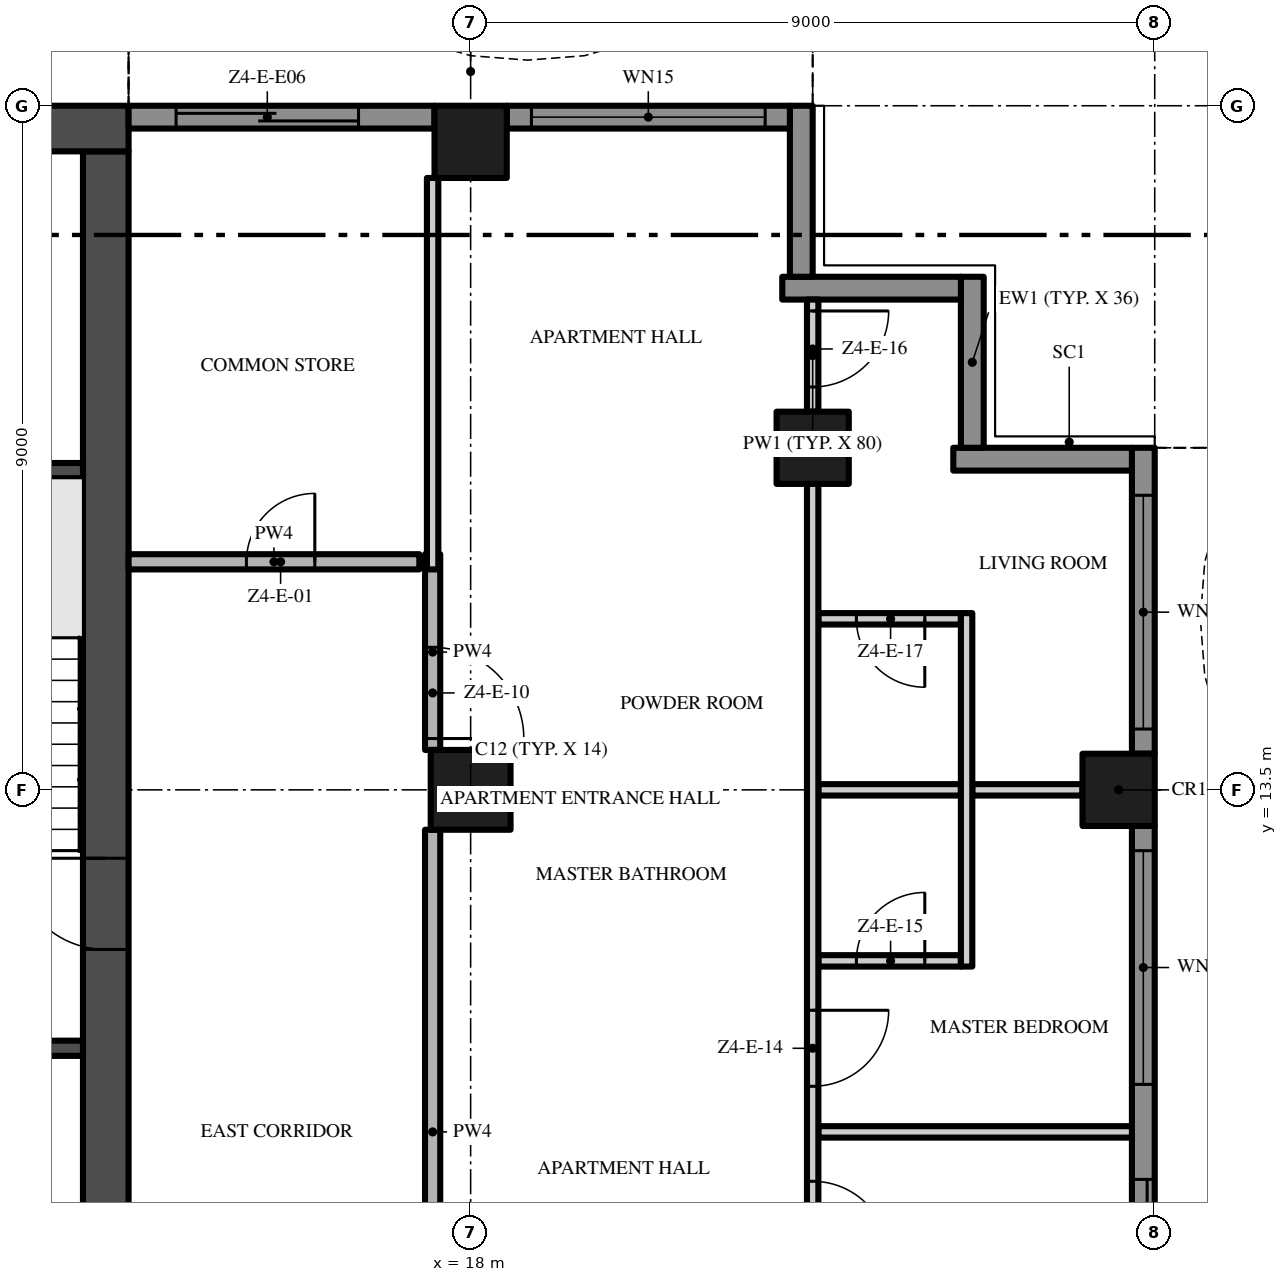
"""IFC4 building model, lengths in metres.
Left out: names, types, materials, properties, quantities, classifications, styles, units other than length and angle.
Written with IfcOpenShell. Run it as: python <this file> out.ifc"""

import sys

from ifc_helpers import new_model, si_unit, direction, frame, frame_2d, origin, origin_2d, place, context, subcontext, project, spatial, polyline, rectangle, outline, extrude, element, fill, save


model = new_model("IFC4")
c1 = context("Model", 3, precision=1e-05, world=origin(), true_north=direction((0.0, 1.0)))
c2 = subcontext(c1, "Body", "Model", "MODEL_VIEW")
j1 = project(units=[si_unit("LENGTHUNIT", "METRE"), si_unit("PLANEANGLEUNIT", "RADIAN")], contexts=[c1])
p1 = place(None, origin())
s1 = spatial("IfcSite", under=j1, at=p1, CompositionType="ELEMENT")
p2 = place(p1, origin())
s2 = spatial("IfcBuilding", under=s1, at=p2, CompositionType="ELEMENT")
p3 = place(p2, frame((0.0, 0.0, 226.2)))
s3 = spatial("IfcBuildingStorey", under=s2, at=p3, CompositionType="ELEMENT", Elevation=226.2)
p4 = place(p3, frame((13.2, 5.1, -0.3), z_axis=(0.0, 0.0, 1.0), x_axis=(0.0, 1.0, 0.0)))
e1 = element("IfcWall", 1, at=p4, inside=s3, PredefinedType="SHEAR", context=c2, shape_type="SweptSolid", body=[
    extrude(rectangle(XDim=16.8, YDim=0.6, at=frame_2d((8.4, 0.0))), origin(), (0.0, 0.0, 1.0), 3.8),
])
p5 = place(p4, frame((6.3, 0.0, 0.3)))
e2 = element("IfcOpeningElement", 2, at=p5, cuts=e1, PredefinedType="OPENING", context=c2, shape_type="SweptSolid", body=[
    extrude(rectangle(XDim=1.2, YDim=2.2, at=frame_2d((0.6, 1.1))), frame((0.0, 0.31, 0.0), z_axis=(0.0, -1.0, 0.0), x_axis=(1.0, 0.0, 0.0)), (0.0, 0.0, 1.0), 0.62),
])
p6 = place(p3, frame((13.5, 22.2, -0.3), z_axis=(0.0, 0.0, 1.0), x_axis=(-1.0, 0.0, 0.0)))
e3 = element("IfcWall", 3, at=p6, inside=s3, PredefinedType="SHEAR", context=c2, shape_type="SweptSolid", body=[
    extrude(rectangle(XDim=27.0, YDim=0.6, at=frame_2d((13.5, 0.0))), origin(), (0.0, 0.0, 1.0), 3.8),
])
p7 = place(p3, frame((18.0, 13.5, 0.0), z_axis=(0.0, 0.0, 1.0), x_axis=(1.0, 0.0, 0.0)))
e4 = element("IfcColumn", 4, at=p7, inside=s3, PredefinedType="COLUMN", context=c2, shape_type="SweptSolid", body=[
    extrude(rectangle(XDim=1.05, YDim=1.05, at=origin_2d()), origin(), (0.0, 0.0, 1.0), 3.5),
])
for number, where, z_axis, x_axis in (
    (5, (18.0, 22.025, 0.0), (0.0, 0.0, 1.0), (1.0, 0.0, 0.0)),
    (6, (26.525, 13.5, 0.0), (0.0, 0.0, 1.0), (1.0, 0.0, 0.0)),
    (7, (22.5, 18.0, 0.0), (0.0, 0.0, 1.0), (1.0, 0.0, 0.0)),
):
    element("IfcColumn", number, at=place(p3, frame(where, z_axis=z_axis, x_axis=x_axis)), inside=s3, PredefinedType="COLUMN", context=c2, shape_type="SweptSolid", body=[
        extrude(rectangle(XDim=0.95, YDim=0.95, at=origin_2d()), origin(), (0.0, 0.0, 1.0), 3.5),
    ])
p8 = place(p3, frame((26.85, 13.025, 0.0), z_axis=(0.0, 0.0, 1.0), x_axis=(0.0, -1.0, 0.0)))
e8 = element("IfcWall", 8, at=p8, inside=s3, PredefinedType="SOLIDWALL", context=c2, shape_type="SweptSolid", body=[
    extrude(rectangle(XDim=8.05, YDim=0.3, at=frame_2d((4.025, 0.0))), origin(), (0.0, 0.0, 1.0), 3.5),
])
p9 = place(p8, frame((4.65, 0.0, 0.0)))
e9 = element("IfcOpeningElement", 9, at=p9, cuts=e8, PredefinedType="OPENING", context=c2, shape_type="SweptSolid", body=[
    extrude(rectangle(XDim=3.075, YDim=2.4, at=frame_2d((1.538, 1.2))), frame((0.0, 0.16, 0.0), z_axis=(0.0, -1.0, 0.0), x_axis=(1.0, 0.0, 0.0)), (0.0, 0.0, 1.0), 0.32),
])
p10 = place(p8, frame((0.325, 0.0, 0.45)))
e10 = element("IfcOpeningElement", 10, at=p10, cuts=e8, PredefinedType="OPENING", context=c2, shape_type="SweptSolid", body=[
    extrude(rectangle(XDim=3.075, YDim=2.65, at=frame_2d((1.538, 1.325))), frame((0.0, 0.16, 0.0), z_axis=(0.0, -1.0, 0.0), x_axis=(1.0, 0.0, 0.0)), (0.0, 0.0, 1.0), 0.32),
])
p11 = place(p3, frame((26.85, 18.0, 0.0), z_axis=(0.0, 0.0, 1.0), x_axis=(0.0, -1.0, 0.0)))
e11 = element("IfcWall", 11, at=p11, inside=s3, PredefinedType="SOLIDWALL", context=c2, shape_type="SweptSolid", body=[
    extrude(rectangle(XDim=4.025, YDim=0.3, at=frame_2d((2.013, 0.0))), origin(), (0.0, 0.0, 1.0), 3.5),
])
p12 = place(p11, frame((0.625, 0.0, 0.45)))
e12 = element("IfcOpeningElement", 12, at=p12, cuts=e11, PredefinedType="OPENING", context=c2, shape_type="SweptSolid", body=[
    extrude(rectangle(XDim=3.075, YDim=2.65, at=frame_2d((1.538, 1.325))), frame((0.0, 0.16, 0.0), z_axis=(0.0, -1.0, 0.0), x_axis=(1.0, 0.0, 0.0)), (0.0, 0.0, 1.0), 0.32),
])
p13 = place(p3, frame((24.35, 17.85, 0.0), z_axis=(0.0, 0.0, 1.0), x_axis=(1.0, 0.0, 0.0)))
e13 = element("IfcWall", 13, at=p13, inside=s3, PredefinedType="SOLIDWALL", context=c2, shape_type="SweptSolid", body=[
    extrude(rectangle(XDim=2.35, YDim=0.3, at=frame_2d((1.175, 0.0))), origin(), (0.0, 0.0, 1.0), 3.5),
])
p14 = place(p3, frame((24.6, 20.25, 0.0), z_axis=(0.0, 0.0, 1.0), x_axis=(0.0, -1.0, 0.0)))
e14 = element("IfcWall", 14, at=p14, inside=s3, PredefinedType="SOLIDWALL", context=c2, shape_type="SweptSolid", body=[
    extrude(rectangle(XDim=2.25, YDim=0.3, at=frame_2d((1.125, 0.0))), origin(), (0.0, 0.0, 1.0), 3.5),
])
p15 = place(p3, frame((22.1, 20.1, 0.0), z_axis=(0.0, 0.0, 1.0), x_axis=(1.0, 0.0, 0.0)))
e15 = element("IfcWall", 15, at=p15, inside=s3, PredefinedType="SOLIDWALL", context=c2, shape_type="SweptSolid", body=[
    extrude(rectangle(XDim=2.35, YDim=0.3, at=frame_2d((1.175, 0.0))), origin(), (0.0, 0.0, 1.0), 3.5),
])
p16 = place(p3, frame((22.35, 22.5, 0.0), z_axis=(0.0, 0.0, 1.0), x_axis=(0.0, -1.0, 0.0)))
e16 = element("IfcWall", 16, at=p16, inside=s3, PredefinedType="SOLIDWALL", context=c2, shape_type="SweptSolid", body=[
    extrude(rectangle(XDim=2.25, YDim=0.3, at=frame_2d((1.125, 0.0))), origin(), (0.0, 0.0, 1.0), 3.5),
])
p17 = place(p3, frame((18.475, 22.35, 0.0), z_axis=(0.0, 0.0, 1.0), x_axis=(1.0, 0.0, 0.0)))
e17 = element("IfcWall", 17, at=p17, inside=s3, PredefinedType="SOLIDWALL", context=c2, shape_type="SweptSolid", body=[
    extrude(rectangle(XDim=3.725, YDim=0.3, at=frame_2d((1.863, 0.0))), origin(), (0.0, 0.0, 1.0), 3.5),
])
p18 = place(p17, frame((0.325, 0.0, 0.45)))
e18 = element("IfcOpeningElement", 18, at=p18, cuts=e17, PredefinedType="OPENING", context=c2, shape_type="SweptSolid", body=[
    extrude(rectangle(XDim=3.075, YDim=2.65, at=frame_2d((1.538, 1.325))), frame((0.0, 0.16, 0.0), z_axis=(0.0, -1.0, 0.0), x_axis=(1.0, 0.0, 0.0)), (0.0, 0.0, 1.0), 0.32),
])
p19 = place(p3, frame((13.5, 22.35, 0.0), z_axis=(0.0, 0.0, 1.0), x_axis=(1.0, 0.0, 0.0)))
e19 = element("IfcWall", 19, at=p19, inside=s3, PredefinedType="SOLIDWALL", context=c2, shape_type="SweptSolid", body=[
    extrude(rectangle(XDim=4.025, YDim=0.3, at=frame_2d((2.013, 0.0))), origin(), (0.0, 0.0, 1.0), 3.5),
])
p20 = place(p19, frame((0.625, 0.0, 0.0)))
e20 = element("IfcOpeningElement", 20, at=p20, cuts=e19, PredefinedType="OPENING", context=c2, shape_type="SweptSolid", body=[
    extrude(rectangle(XDim=2.4, YDim=2.4, at=frame_2d((1.2, 1.2))), frame((0.0, 0.16, 0.0), z_axis=(0.0, -1.0, 0.0), x_axis=(1.0, 0.0, 0.0)), (0.0, 0.0, 1.0), 0.32),
])
p21 = place(p3, origin())
e21 = element("IfcWall", 21, at=p21, inside=s3, PredefinedType="USERDEFINED", context=c2, shape_type="SweptSolid", body=[
    extrude(outline(polyline([(28.8, -18.0), (28.095, -16.5), (27.659, -15.0), (27.6, -14.25), (27.659, -13.5), (28.095, -12.0), (28.8, -10.5), (29.505, -9.0), (29.941, -7.5), (30.0, -6.75), (29.941, -6.0), (29.505, -4.5), (28.8, -3.0), (28.095, -1.5), (27.659, 0.0), (27.6, 0.75), (27.659, 1.5), (28.095, 3.0), (28.8, 4.5), (29.505, 6.0), (29.941, 7.5), (30.0, 8.25), (29.941, 9.0), (29.505, 10.5), (28.8, 12.0), (28.095, 13.5), (27.659, 15.0), (27.6, 15.75), (27.659, 16.5), (28.095, 18.0), (27.855, 18.07), (27.411, 16.545), (27.349, 15.75), (27.411, 14.955), (27.86, 13.411), (28.574, 11.894), (29.271, 10.411), (29.694, 8.955), (29.749, 8.25), (29.694, 7.545), (29.271, 6.089), (28.574, 4.606), (27.86, 3.089), (27.411, 1.545), (27.349, 0.75), (27.411, -0.045), (27.86, -1.589), (28.574, -3.106), (29.271, -4.589), (29.694, -6.045), (29.749, -6.75), (29.694, -7.455), (29.271, -8.911), (28.574, -10.394), (27.86, -11.911), (27.411, -13.455), (27.349, -14.25), (27.411, -15.045), (27.86, -16.589), (28.574, -18.106), (28.8, -18.0)])), origin(), (0.0, 0.0, 1.0), 0.9),
])
p22 = place(p3, origin())
e22 = element("IfcWall", 22, at=p22, inside=s3, PredefinedType="USERDEFINED", context=c2, shape_type="SweptSolid", body=[
    extrude(outline(polyline([(22.5, 24.3), (21.0, 23.595), (19.5, 23.159), (18.75, 23.1), (18.0, 23.159), (16.5, 23.595), (15.0, 24.3), (13.5, 25.005), (13.394, 24.779), (14.894, 24.074), (16.411, 23.36), (17.955, 22.911), (18.75, 22.849), (19.545, 22.911), (21.089, 23.36), (22.606, 24.074), (22.5, 24.3)])), origin(), (0.0, 0.0, 1.0), 0.9),
])
for number, where, z_axis, x_axis in (
    (23, (9.65, 10.1, 0.0), (0.0, 0.0, 1.0), (1.0, 0.0, 0.0)),
    (24, (9.65, 17.7, 0.0), (0.0, 0.0, 1.0), (1.0, 0.0, 0.0)),
):
    element("IfcWall", number, at=place(p3, frame(where, z_axis=z_axis, x_axis=x_axis)), inside=s3, PredefinedType="SHEAR", context=c2, shape_type="SweptSolid", body=[
        extrude(rectangle(XDim=3.25, YDim=0.2, at=frame_2d((1.625, 0.0))), origin(), (0.0, 0.0, 1.0), 3.5),
    ])
p23 = place(p3, frame((22.575, 9.0, 0.0), z_axis=(0.0, 0.0, 1.0), x_axis=(1.0, 0.0, 0.0)))
e25 = element("IfcWall", 25, at=p23, inside=s3, PredefinedType="PARTITIONING", context=c2, shape_type="SweptSolid", body=[
    extrude(rectangle(XDim=4.125, YDim=0.15, at=frame_2d((2.062, 0.0))), origin(), (0.0, 0.0, 1.0), 3.5),
])
p24 = place(p3, frame((22.575, 11.25, 0.0), z_axis=(0.0, 0.0, 1.0), x_axis=(1.0, 0.0, 0.0)))
e26 = element("IfcWall", 26, at=p24, inside=s3, PredefinedType="PARTITIONING", context=c2, shape_type="SweptSolid", body=[
    extrude(rectangle(XDim=1.875, YDim=0.15, at=frame_2d((0.938, 0.0))), origin(), (0.0, 0.0, 1.0), 3.5),
])
p25 = place(p24, frame((0.5, 0.0, 0.0)))
e27 = element("IfcOpeningElement", 27, at=p25, cuts=e26, PredefinedType="OPENING", context=c2, shape_type="SweptSolid", body=[
    extrude(rectangle(XDim=0.9, YDim=2.1, at=frame_2d((0.45, 1.05))), frame((0.0, 0.085, 0.0), z_axis=(0.0, -1.0, 0.0), x_axis=(1.0, 0.0, 0.0)), (0.0, 0.0, 1.0), 0.17),
])
p26 = place(p3, frame((22.575, 13.5, 0.0), z_axis=(0.0, 0.0, 1.0), x_axis=(1.0, 0.0, 0.0)))
e28 = element("IfcWall", 28, at=p26, inside=s3, PredefinedType="PARTITIONING", context=c2, shape_type="SweptSolid", body=[
    extrude(rectangle(XDim=1.875, YDim=0.15, at=frame_2d((0.938, 0.0))), origin(), (0.0, 0.0, 1.0), 3.5),
])
p27 = place(p3, frame((24.6, 13.5, 0.0), z_axis=(0.0, 0.0, 1.0), x_axis=(1.0, 0.0, 0.0)))
e29 = element("IfcWall", 29, at=p27, inside=s3, PredefinedType="PARTITIONING", context=c2, shape_type="SweptSolid", body=[
    extrude(rectangle(XDim=1.45, YDim=0.15, at=frame_2d((0.725, 0.0))), origin(), (0.0, 0.0, 1.0), 3.5),
])
p28 = place(p3, frame((24.45, 15.75, 0.0), z_axis=(0.0, 0.0, 1.0), x_axis=(-1.0, 0.0, 0.0)))
e30 = element("IfcWall", 30, at=p28, inside=s3, PredefinedType="PARTITIONING", context=c2, shape_type="SweptSolid", body=[
    extrude(rectangle(XDim=1.875, YDim=0.15, at=frame_2d((0.938, 0.0))), origin(), (0.0, 0.0, 1.0), 3.5),
])
p29 = place(p28, frame((0.475, 0.0, 0.0)))
e31 = element("IfcOpeningElement", 31, at=p29, cuts=e30, PredefinedType="OPENING", context=c2, shape_type="SweptSolid", body=[
    extrude(rectangle(XDim=0.9, YDim=2.1, at=frame_2d((0.45, 1.05))), frame((0.0, 0.085, 0.0), z_axis=(0.0, -1.0, 0.0), x_axis=(1.0, 0.0, 0.0)), (0.0, 0.0, 1.0), 0.17),
])
p30 = place(p3, frame((13.5, 16.5, 0.0), z_axis=(0.0, 0.0, 1.0), x_axis=(1.0, 0.0, 0.0)))
e32 = element("IfcWall", 32, at=p30, inside=s3, PredefinedType="PARTITIONING", context=c2, shape_type="SweptSolid", body=[
    extrude(rectangle(XDim=3.825, YDim=0.2, at=frame_2d((1.913, 0.0))), origin(), (0.0, 0.0, 1.0), 3.5),
])
p31 = place(p30, frame((1.55, 0.0, 0.0)))
e33 = element("IfcOpeningElement", 33, at=p31, cuts=e32, PredefinedType="OPENING", context=c2, shape_type="SweptSolid", body=[
    extrude(rectangle(XDim=0.9, YDim=2.1, at=frame_2d((0.45, 1.05))), frame((0.0, 0.11, 0.0), z_axis=(0.0, -1.0, 0.0), x_axis=(1.0, 0.0, 0.0)), (0.0, 0.0, 1.0), 0.22),
])
p32 = place(p3, frame((17.5, 5.025, 0.0), z_axis=(0.0, 0.0, 1.0), x_axis=(0.0, 1.0, 0.0)))
e34 = element("IfcWall", 34, at=p32, inside=s3, PredefinedType="PARTITIONING", context=c2, shape_type="SweptSolid", body=[
    extrude(rectangle(XDim=7.95, YDim=0.2, at=frame_2d((3.975, 0.0))), origin(), (0.0, 0.0, 1.0), 3.5),
])
p33 = place(p3, frame((17.5, 16.6, 0.0), z_axis=(0.0, 0.0, 1.0), x_axis=(0.0, -1.0, 0.0)))
e35 = element("IfcWall", 35, at=p33, inside=s3, PredefinedType="PARTITIONING", context=c2, shape_type="SweptSolid", body=[
    extrude(rectangle(XDim=2.575, YDim=0.2, at=frame_2d((1.288, 0.0))), origin(), (0.0, 0.0, 1.0), 3.5),
])
p34 = place(p33, frame((1.225, 0.0, 0.0)))
e36 = element("IfcOpeningElement", 36, at=p34, cuts=e35, PredefinedType="OPENING", context=c2, shape_type="SweptSolid", body=[
    extrude(rectangle(XDim=1.2, YDim=2.4, at=frame_2d((0.6, 1.2))), frame((0.0, 0.11, 0.0), z_axis=(0.0, -1.0, 0.0), x_axis=(1.0, 0.0, 0.0)), (0.0, 0.0, 1.0), 0.22),
])
p35 = place(p3, frame((17.5, 16.4, 0.0), z_axis=(0.0, 0.0, 1.0), x_axis=(0.0, 1.0, 0.0)))
e37 = element("IfcWall", 37, at=p35, inside=s3, PredefinedType="PARTITIONING", context=c2, shape_type="SweptSolid", body=[
    extrude(rectangle(XDim=5.15, YDim=0.15, at=frame_2d((2.575, 0.0))), origin(), (0.0, 0.0, 1.0), 3.5),
])
p36 = place(p3, frame((22.5, 17.525, 0.0), z_axis=(0.0, 0.0, 1.0), x_axis=(0.0, -1.0, 0.0)))
e38 = element("IfcWall", 38, at=p36, inside=s3, PredefinedType="PARTITIONING", context=c2, shape_type="SweptSolid", body=[
    extrude(rectangle(XDim=17.425, YDim=0.15, at=frame_2d((8.713, 0.0))), origin(), (0.0, 0.0, 1.0), 3.5),
])
p37 = place(p36, frame((14.775, 0.0, 0.0)))
e39 = element("IfcOpeningElement", 39, at=p37, cuts=e38, PredefinedType="OPENING", context=c2, shape_type="SweptSolid", body=[
    extrude(rectangle(XDim=1.0, YDim=2.4, at=frame_2d((0.5, 1.2))), frame((0.0, 0.085, 0.0), z_axis=(0.0, -1.0, 0.0), x_axis=(1.0, 0.0, 0.0)), (0.0, 0.0, 1.0), 0.17),
])
p38 = place(p36, frame((9.175, 0.0, 0.0)))
e40 = element("IfcOpeningElement", 40, at=p38, cuts=e38, PredefinedType="OPENING", context=c2, shape_type="SweptSolid", body=[
    extrude(rectangle(XDim=1.0, YDim=2.4, at=frame_2d((0.5, 1.2))), frame((0.0, 0.085, 0.0), z_axis=(0.0, -1.0, 0.0), x_axis=(1.0, 0.0, 0.0)), (0.0, 0.0, 1.0), 0.17),
])
p39 = place(p36, frame((6.925, 0.0, 0.0)))
e41 = element("IfcOpeningElement", 41, at=p39, cuts=e38, PredefinedType="OPENING", context=c2, shape_type="SweptSolid", body=[
    extrude(rectangle(XDim=1.0, YDim=2.4, at=frame_2d((0.5, 1.2))), frame((0.0, 0.085, 0.0), z_axis=(0.0, -1.0, 0.0), x_axis=(1.0, 0.0, 0.0)), (0.0, 0.0, 1.0), 0.17),
])
p40 = place(p3, frame((22.5, 19.95, 0.0), z_axis=(0.0, 0.0, 1.0), x_axis=(0.0, -1.0, 0.0)))
e42 = element("IfcWall", 42, at=p40, inside=s3, PredefinedType="PARTITIONING", context=c2, shape_type="SweptSolid", body=[
    extrude(rectangle(XDim=1.475, YDim=0.15, at=frame_2d((0.738, 0.0))), origin(), (0.0, 0.0, 1.0), 3.5),
])
p41 = place(p40, frame((0.15, 0.0, 0.0)))
e43 = element("IfcOpeningElement", 43, at=p41, cuts=e42, PredefinedType="OPENING", context=c2, shape_type="SweptSolid", body=[
    extrude(rectangle(XDim=1.0, YDim=2.4, at=frame_2d((0.5, 1.2))), frame((0.0, 0.085, 0.0), z_axis=(0.0, -1.0, 0.0), x_axis=(1.0, 0.0, 0.0)), (0.0, 0.0, 1.0), 0.17),
])
p42 = place(p3, frame((24.525, 11.175, 0.0), z_axis=(0.0, 0.0, 1.0), x_axis=(0.0, 1.0, 0.0)))
e44 = element("IfcWall", 44, at=p42, inside=s3, PredefinedType="PARTITIONING", context=c2, shape_type="SweptSolid", body=[
    extrude(rectangle(XDim=4.65, YDim=0.15, at=frame_2d((2.325, 0.0))), origin(), (0.0, 0.0, 1.0), 3.5),
])
p43 = place(p9, origin())
e45 = element("IfcDoor", 45, at=p43, inside=s3, OperationType="SINGLE_SWING_LEFT", PredefinedType="DOOR", context=c2, shape_type="SweptSolid", body=[
    extrude(rectangle(XDim=3.075, YDim=2.4, at=frame_2d((1.538, 1.2))), frame((0.0, 0.025, 0.0), z_axis=(0.0, -1.0, 0.0), x_axis=(1.0, 0.0, 0.0)), (0.0, 0.0, 1.0), 0.05),
])
fill(e9, e45)
p44 = place(p10, origin())
e46 = element("IfcWindow", 46, at=p44, inside=s3, PartitioningType="SINGLE_PANEL", PredefinedType="WINDOW", context=c2, shape_type="SweptSolid", body=[
    extrude(rectangle(XDim=3.075, YDim=2.65, at=frame_2d((1.538, 1.325))), frame((0.0, 0.03, 0.0), z_axis=(0.0, -1.0, 0.0), x_axis=(1.0, 0.0, 0.0)), (0.0, 0.0, 1.0), 0.06),
])
fill(e10, e46)
p45 = place(p12, origin())
e47 = element("IfcWindow", 47, at=p45, inside=s3, PartitioningType="SINGLE_PANEL", PredefinedType="WINDOW", context=c2, shape_type="SweptSolid", body=[
    extrude(rectangle(XDim=3.075, YDim=2.65, at=frame_2d((1.538, 1.325))), frame((0.0, 0.03, 0.0), z_axis=(0.0, -1.0, 0.0), x_axis=(1.0, 0.0, 0.0)), (0.0, 0.0, 1.0), 0.06),
])
fill(e12, e47)
p46 = place(p18, origin())
e48 = element("IfcWindow", 48, at=p46, inside=s3, PartitioningType="SINGLE_PANEL", PredefinedType="WINDOW", context=c2, shape_type="SweptSolid", body=[
    extrude(rectangle(XDim=3.075, YDim=2.65, at=frame_2d((1.538, 1.325))), frame((0.0, 0.03, 0.0), z_axis=(0.0, -1.0, 0.0), x_axis=(1.0, 0.0, 0.0)), (0.0, 0.0, 1.0), 0.06),
])
fill(e18, e48)
p47 = place(p20, origin())
e49 = element("IfcDoor", 49, at=p47, inside=s3, OperationType="SINGLE_SWING_LEFT", PredefinedType="DOOR", context=c2, shape_type="SweptSolid", body=[
    extrude(rectangle(XDim=2.4, YDim=2.4, at=frame_2d((1.2, 1.2))), frame((0.0, 0.025, 0.0), z_axis=(0.0, -1.0, 0.0), x_axis=(1.0, 0.0, 0.0)), (0.0, 0.0, 1.0), 0.05),
])
fill(e20, e49)
p48 = place(p5, frame((1.2, 0.0, 0.0), z_axis=(0.0, 0.0, 1.0), x_axis=(-1.0, 0.0, 0.0)))
e50 = element("IfcDoor", 50, at=p48, inside=s3, OperationType="SINGLE_SWING_LEFT", PredefinedType="DOOR", context=c2, shape_type="SweptSolid", body=[
    extrude(rectangle(XDim=1.2, YDim=2.2, at=frame_2d((0.6, 1.1))), frame((0.0, 0.025, 0.0), z_axis=(0.0, -1.0, 0.0), x_axis=(1.0, 0.0, 0.0)), (0.0, 0.0, 1.0), 0.05),
])
fill(e2, e50)
p49 = place(p31, origin())
e51 = element("IfcDoor", 51, at=p49, inside=s3, OperationType="SINGLE_SWING_RIGHT", PredefinedType="DOOR", context=c2, shape_type="SweptSolid", body=[
    extrude(rectangle(XDim=0.9, YDim=2.1, at=frame_2d((0.45, 1.05))), frame((0.0, 0.025, 0.0), z_axis=(0.0, -1.0, 0.0), x_axis=(1.0, 0.0, 0.0)), (0.0, 0.0, 1.0), 0.05),
])
fill(e33, e51)
p50 = place(p34, origin())
e52 = element("IfcDoor", 52, at=p50, inside=s3, OperationType="SINGLE_SWING_RIGHT", PredefinedType="DOOR", context=c2, shape_type="SweptSolid", body=[
    extrude(rectangle(XDim=1.2, YDim=2.4, at=frame_2d((0.6, 1.2))), frame((0.0, 0.025, 0.0), z_axis=(0.0, -1.0, 0.0), x_axis=(1.0, 0.0, 0.0)), (0.0, 0.0, 1.0), 0.05),
])
fill(e36, e52)
p51 = place(p38, origin())
e53 = element("IfcDoor", 53, at=p51, inside=s3, OperationType="SINGLE_SWING_RIGHT", PredefinedType="DOOR", context=c2, shape_type="SweptSolid", body=[
    extrude(rectangle(XDim=1.0, YDim=2.4, at=frame_2d((0.5, 1.2))), frame((0.0, 0.025, 0.0), z_axis=(0.0, -1.0, 0.0), x_axis=(1.0, 0.0, 0.0)), (0.0, 0.0, 1.0), 0.05),
])
fill(e40, e53)
p52 = place(p39, origin())
e54 = element("IfcDoor", 54, at=p52, inside=s3, OperationType="SINGLE_SWING_LEFT", PredefinedType="DOOR", context=c2, shape_type="SweptSolid", body=[
    extrude(rectangle(XDim=1.0, YDim=2.4, at=frame_2d((0.5, 1.2))), frame((0.0, 0.025, 0.0), z_axis=(0.0, -1.0, 0.0), x_axis=(1.0, 0.0, 0.0)), (0.0, 0.0, 1.0), 0.05),
])
fill(e41, e54)
p53 = place(p25, origin())
e55 = element("IfcDoor", 55, at=p53, inside=s3, OperationType="SINGLE_SWING_RIGHT", PredefinedType="DOOR", context=c2, shape_type="SweptSolid", body=[
    extrude(rectangle(XDim=0.9, YDim=2.1, at=frame_2d((0.45, 1.05))), frame((0.0, 0.025, 0.0), z_axis=(0.0, -1.0, 0.0), x_axis=(1.0, 0.0, 0.0)), (0.0, 0.0, 1.0), 0.05),
])
fill(e27, e55)
p54 = place(p41, origin())
e56 = element("IfcDoor", 56, at=p54, inside=s3, OperationType="SINGLE_SWING_LEFT", PredefinedType="DOOR", context=c2, shape_type="SweptSolid", body=[
    extrude(rectangle(XDim=1.0, YDim=2.4, at=frame_2d((0.5, 1.2))), frame((0.0, 0.025, 0.0), z_axis=(0.0, -1.0, 0.0), x_axis=(1.0, 0.0, 0.0)), (0.0, 0.0, 1.0), 0.05),
])
fill(e43, e56)
p55 = place(p29, origin())
e57 = element("IfcDoor", 57, at=p55, inside=s3, OperationType="SINGLE_SWING_LEFT", PredefinedType="DOOR", context=c2, shape_type="SweptSolid", body=[
    extrude(rectangle(XDim=0.9, YDim=2.1, at=frame_2d((0.45, 1.05))), frame((0.0, 0.025, 0.0), z_axis=(0.0, -1.0, 0.0), x_axis=(1.0, 0.0, 0.0)), (0.0, 0.0, 1.0), 0.05),
])
fill(e31, e57)
save(model, sys.argv[1])
